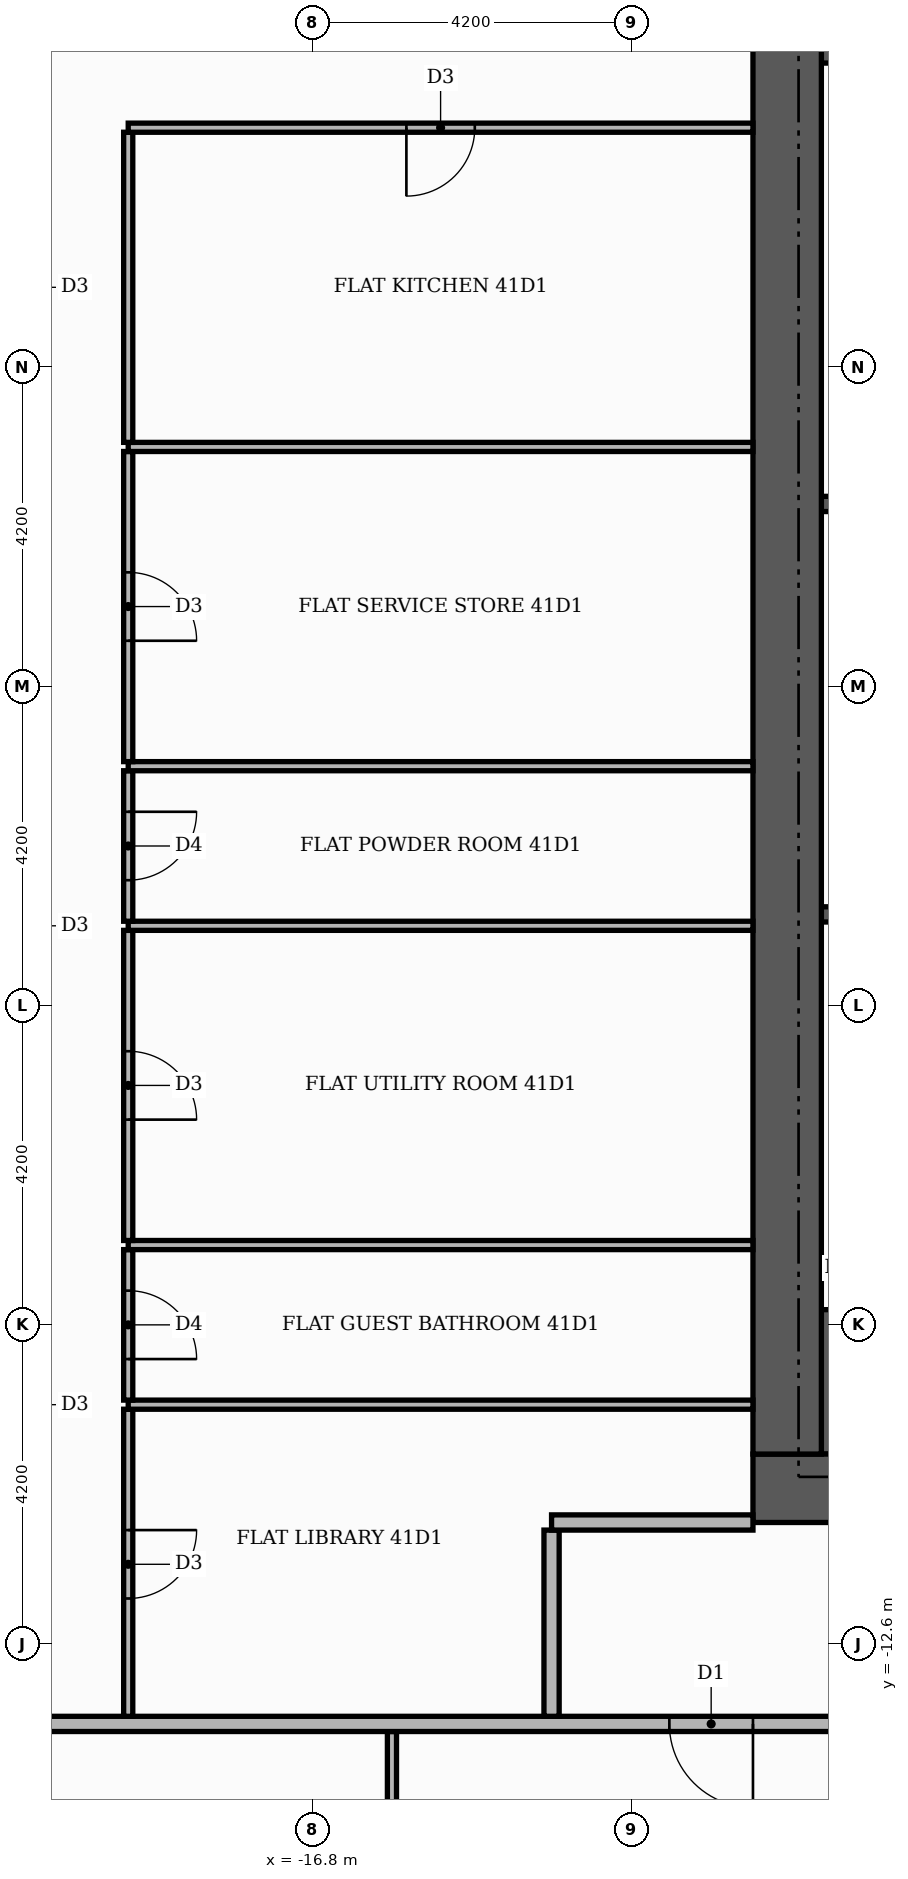
"""IFC4 building model, lengths in metres.
Left out: names, types, materials, properties, quantities, classifications, styles, units other than length and angle.
Written with IfcOpenShell. Run it as: python <this file> out.ifc"""

import sys

from ifc_helpers import new_model, si_unit, direction, frame, frame_2d, origin, place, context, subcontext, project, spatial, rectangle, extrude, element, fill, save


model = new_model("IFC4")
c1 = context("Model", 3, precision=1e-05, world=origin(), true_north=direction((0.0, 1.0)))
c2 = subcontext(c1, "Body", "Model", "MODEL_VIEW")
j1 = project(units=[si_unit("LENGTHUNIT", "METRE"), si_unit("PLANEANGLEUNIT", "RADIAN")], contexts=[c1])
p1 = place(None, origin())
s1 = spatial("IfcSite", under=j1, at=p1, CompositionType="ELEMENT")
p2 = place(p1, origin())
s2 = spatial("IfcBuilding", under=s1, at=p2, CompositionType="ELEMENT")
p3 = place(p2, frame((0.0, 0.0, 172.8)))
s3 = spatial("IfcBuildingStorey", under=s2, at=p3, CompositionType="ELEMENT", Elevation=172.8)
for number, where, z_axis, x_axis in (
    (1, (-10.1, -9.15, 0.0), (0.0, 0.0, 1.0), (1.0, 0.0, 0.0)),
    (2, (-10.1, 9.15, 0.0), (0.0, 0.0, 1.0), (1.0, 0.0, 0.0)),
):
    element("IfcWall", number, at=place(p3, frame(where, z_axis=z_axis, x_axis=x_axis)), inside=s3, PredefinedType="SHEAR", context=c2, shape_type="SweptSolid", body=[
        extrude(rectangle(XDim=4.6, YDim=1.9, at=frame_2d((2.3, 0.0))), origin(), (0.0, 0.0, 1.0), 3.48),
    ])
for number, where, z_axis, x_axis in (
    (3, (-10.1, -3.0, 0.0), (0.0, 0.0, 1.0), (1.0, 0.0, 0.0)),
    (4, (-10.1, 2.4, 0.0), (0.0, 0.0, 1.0), (1.0, 0.0, 0.0)),
):
    element("IfcWall", number, at=place(p3, frame(where, z_axis=z_axis, x_axis=x_axis)), inside=s3, PredefinedType="SHEAR", context=c2, shape_type="SweptSolid", body=[
        extrude(rectangle(XDim=0.9, YDim=0.2, at=frame_2d((0.45, 0.0))), origin(), (0.0, 0.0, 1.0), 3.48),
    ])
p4 = place(p3, frame((-11.0, -10.55, 0.0), z_axis=(0.0, 0.0, 1.0), x_axis=(1.0, 0.0, 0.0)))
e5 = element("IfcWall", 5, at=p4, inside=s3, PredefinedType="SHEAR", context=c2, shape_type="SweptSolid", body=[
    extrude(rectangle(XDim=22.0, YDim=0.9, at=frame_2d((11.0, 0.0))), origin(), (0.0, 0.0, 1.0), 3.48),
])
p5 = place(p4, frame((7.4, 0.0, 0.0)))
e6 = element("IfcOpeningElement", 6, at=p5, cuts=e5, PredefinedType="OPENING", context=c2, shape_type="SweptSolid", body=[
    extrude(rectangle(XDim=1.8, YDim=2.2, at=frame_2d((0.9, 1.1))), frame((0.0, 0.46, 0.0), z_axis=(0.0, -1.0, 0.0), x_axis=(1.0, 0.0, 0.0)), (0.0, 0.0, 1.0), 0.92),
])
p6 = place(p3, frame((-10.55, -10.1, 0.0), z_axis=(0.0, 0.0, 1.0), x_axis=(0.0, 1.0, 0.0)))
e7 = element("IfcWall", 7, at=p6, inside=s3, PredefinedType="SHEAR", context=c2, shape_type="SweptSolid", body=[
    extrude(rectangle(XDim=20.2, YDim=0.9, at=frame_2d((10.1, 0.0))), origin(), (0.0, 0.0, 1.0), 3.48),
])
p7 = place(p3, frame((-15.75, -20.06, 0.0), z_axis=(0.0, 0.0, 1.0), x_axis=(0.0, 1.0, 0.0)))
e8 = element("IfcWall", 8, at=p7, inside=s3, PredefinedType="PARTITIONING", context=c2, shape_type="SweptSolid", body=[
    extrude(rectangle(XDim=6.31, YDim=0.12, at=frame_2d((3.155, 0.0))), origin(), (0.0, 0.0, 1.0), 3.48),
])
p8 = place(p7, frame((2.675, 0.0, 0.0)))
e9 = element("IfcOpeningElement", 9, at=p8, cuts=e8, PredefinedType="OPENING", context=c2, shape_type="SweptSolid", body=[
    extrude(rectangle(XDim=1.0, YDim=2.1, at=frame_2d((0.5, 1.05))), frame((0.0, 0.07, 0.0), z_axis=(0.0, -1.0, 0.0), x_axis=(1.0, 0.0, 0.0)), (0.0, 0.0, 1.0), 0.14),
])
p9 = place(p3, frame((-25.42, -13.65, 0.0), z_axis=(0.0, 0.0, 1.0), x_axis=(1.0, 0.0, 0.0)))
e10 = element("IfcWall", 10, at=p9, inside=s3, PredefinedType="PARTITIONING", context=c2, shape_type="SweptSolid", body=[
    extrude(rectangle(XDim=39.07, YDim=0.2, at=frame_2d((19.535, 0.0))), origin(), (0.0, 0.0, 1.0), 3.48),
])
p10 = place(p9, frame((13.32, 0.0, 0.0)))
e11 = element("IfcOpeningElement", 11, at=p10, cuts=e10, PredefinedType="OPENING", context=c2, shape_type="SweptSolid", body=[
    extrude(rectangle(XDim=1.1, YDim=2.4, at=frame_2d((0.55, 1.2))), frame((0.0, 0.11, 0.0), z_axis=(0.0, -1.0, 0.0), x_axis=(1.0, 0.0, 0.0)), (0.0, 0.0, 1.0), 0.22),
])
p11 = place(p9, frame((21.72, 0.0, 0.0)))
e12 = element("IfcOpeningElement", 12, at=p11, cuts=e10, PredefinedType="OPENING", context=c2, shape_type="SweptSolid", body=[
    extrude(rectangle(XDim=1.1, YDim=2.4, at=frame_2d((0.55, 1.2))), frame((0.0, 0.11, 0.0), z_axis=(0.0, -1.0, 0.0), x_axis=(1.0, 0.0, 0.0)), (0.0, 0.0, 1.0), 0.22),
])
p12 = place(p3, frame((-19.22, -13.55, 0.0), z_axis=(0.0, 0.0, 1.0), x_axis=(0.0, 1.0, 0.0)))
e13 = element("IfcWall", 13, at=p12, inside=s3, PredefinedType="PARTITIONING", context=c2, shape_type="SweptSolid", body=[
    extrude(rectangle(XDim=4.04, YDim=0.12, at=frame_2d((2.02, 0.0))), origin(), (0.0, 0.0, 1.0), 3.48),
])
p13 = place(p12, frame((1.55, 0.0, 0.0)))
e14 = element("IfcOpeningElement", 14, at=p13, cuts=e13, PredefinedType="OPENING", context=c2, shape_type="SweptSolid", body=[
    extrude(rectangle(XDim=0.9, YDim=2.1, at=frame_2d((0.45, 1.05))), frame((0.0, 0.07, 0.0), z_axis=(0.0, -1.0, 0.0), x_axis=(1.0, 0.0, 0.0)), (0.0, 0.0, 1.0), 0.14),
])
p14 = place(p3, frame((-13.65, -13.55, 0.0), z_axis=(0.0, 0.0, 1.0), x_axis=(0.0, 1.0, 0.0)))
e15 = element("IfcWall", 15, at=p14, inside=s3, PredefinedType="PARTITIONING", context=c2, shape_type="SweptSolid", body=[
    extrude(rectangle(XDim=2.45, YDim=0.2, at=frame_2d((1.225, 0.0))), origin(), (0.0, 0.0, 1.0), 3.48),
])
p15 = place(p3, frame((-13.65, -11.0, 0.0), z_axis=(0.0, 0.0, 1.0), x_axis=(1.0, 0.0, 0.0)))
e16 = element("IfcWall", 16, at=p15, inside=s3, PredefinedType="PARTITIONING", context=c2, shape_type="SweptSolid", body=[
    extrude(rectangle(XDim=2.65, YDim=0.2, at=frame_2d((1.325, 0.0))), origin(), (0.0, 0.0, 1.0), 3.48),
])
p16 = place(p3, frame((-19.22, -9.45, 0.0), z_axis=(0.0, 0.0, 1.0), x_axis=(1.0, 0.0, 0.0)))
e17 = element("IfcWall", 17, at=p16, inside=s3, PredefinedType="PARTITIONING", context=c2, shape_type="SweptSolid", body=[
    extrude(rectangle(XDim=8.22, YDim=0.12, at=frame_2d((4.11, 0.0))), origin(), (0.0, 0.0, 1.0), 3.48),
])
p17 = place(p3, frame((-19.22, -9.39, 0.0), z_axis=(0.0, 0.0, 1.0), x_axis=(0.0, 1.0, 0.0)))
e18 = element("IfcWall", 18, at=p17, inside=s3, PredefinedType="PARTITIONING", context=c2, shape_type="SweptSolid", body=[
    extrude(rectangle(XDim=1.98, YDim=0.12, at=frame_2d((0.99, 0.0))), origin(), (0.0, 0.0, 1.0), 3.48),
])
p18 = place(p17, frame((0.54, 0.0, 0.0)))
e19 = element("IfcOpeningElement", 19, at=p18, cuts=e18, PredefinedType="OPENING", context=c2, shape_type="SweptSolid", body=[
    extrude(rectangle(XDim=0.9, YDim=2.1, at=frame_2d((0.45, 1.05))), frame((0.0, 0.07, 0.0), z_axis=(0.0, -1.0, 0.0), x_axis=(1.0, 0.0, 0.0)), (0.0, 0.0, 1.0), 0.14),
])
p19 = place(p3, frame((-19.22, -7.35, 0.0), z_axis=(0.0, 0.0, 1.0), x_axis=(1.0, 0.0, 0.0)))
e20 = element("IfcWall", 20, at=p19, inside=s3, PredefinedType="PARTITIONING", context=c2, shape_type="SweptSolid", body=[
    extrude(rectangle(XDim=8.22, YDim=0.12, at=frame_2d((4.11, 0.0))), origin(), (0.0, 0.0, 1.0), 3.48),
])
p20 = place(p3, frame((-19.22, -7.29, 0.0), z_axis=(0.0, 0.0, 1.0), x_axis=(0.0, 1.0, 0.0)))
e21 = element("IfcWall", 21, at=p20, inside=s3, PredefinedType="PARTITIONING", context=c2, shape_type="SweptSolid", body=[
    extrude(rectangle(XDim=4.08, YDim=0.12, at=frame_2d((2.04, 0.0))), origin(), (0.0, 0.0, 1.0), 3.48),
])
p21 = place(p20, frame((1.59, 0.0, 0.0)))
e22 = element("IfcOpeningElement", 22, at=p21, cuts=e21, PredefinedType="OPENING", context=c2, shape_type="SweptSolid", body=[
    extrude(rectangle(XDim=0.9, YDim=2.1, at=frame_2d((0.45, 1.05))), frame((0.0, 0.07, 0.0), z_axis=(0.0, -1.0, 0.0), x_axis=(1.0, 0.0, 0.0)), (0.0, 0.0, 1.0), 0.14),
])
p22 = place(p3, frame((-19.22, -3.15, 0.0), z_axis=(0.0, 0.0, 1.0), x_axis=(1.0, 0.0, 0.0)))
e23 = element("IfcWall", 23, at=p22, inside=s3, PredefinedType="PARTITIONING", context=c2, shape_type="SweptSolid", body=[
    extrude(rectangle(XDim=8.22, YDim=0.12, at=frame_2d((4.11, 0.0))), origin(), (0.0, 0.0, 1.0), 3.48),
])
p23 = place(p3, frame((-19.22, -3.09, 0.0), z_axis=(0.0, 0.0, 1.0), x_axis=(0.0, 1.0, 0.0)))
e24 = element("IfcWall", 24, at=p23, inside=s3, PredefinedType="PARTITIONING", context=c2, shape_type="SweptSolid", body=[
    extrude(rectangle(XDim=1.98, YDim=0.12, at=frame_2d((0.99, 0.0))), origin(), (0.0, 0.0, 1.0), 3.48),
])
p24 = place(p23, frame((0.54, 0.0, 0.0)))
e25 = element("IfcOpeningElement", 25, at=p24, cuts=e24, PredefinedType="OPENING", context=c2, shape_type="SweptSolid", body=[
    extrude(rectangle(XDim=0.9, YDim=2.1, at=frame_2d((0.45, 1.05))), frame((0.0, 0.07, 0.0), z_axis=(0.0, -1.0, 0.0), x_axis=(1.0, 0.0, 0.0)), (0.0, 0.0, 1.0), 0.14),
])
p25 = place(p3, frame((-19.22, -1.05, 0.0), z_axis=(0.0, 0.0, 1.0), x_axis=(1.0, 0.0, 0.0)))
e26 = element("IfcWall", 26, at=p25, inside=s3, PredefinedType="PARTITIONING", context=c2, shape_type="SweptSolid", body=[
    extrude(rectangle(XDim=8.22, YDim=0.12, at=frame_2d((4.11, 0.0))), origin(), (0.0, 0.0, 1.0), 3.48),
])
p26 = place(p3, frame((-19.22, -0.99, 0.0), z_axis=(0.0, 0.0, 1.0), x_axis=(0.0, 1.0, 0.0)))
e27 = element("IfcWall", 27, at=p26, inside=s3, PredefinedType="PARTITIONING", context=c2, shape_type="SweptSolid", body=[
    extrude(rectangle(XDim=4.08, YDim=0.12, at=frame_2d((2.04, 0.0))), origin(), (0.0, 0.0, 1.0), 3.48),
])
p27 = place(p26, frame((1.59, 0.0, 0.0)))
e28 = element("IfcOpeningElement", 28, at=p27, cuts=e27, PredefinedType="OPENING", context=c2, shape_type="SweptSolid", body=[
    extrude(rectangle(XDim=0.9, YDim=2.1, at=frame_2d((0.45, 1.05))), frame((0.0, 0.07, 0.0), z_axis=(0.0, -1.0, 0.0), x_axis=(1.0, 0.0, 0.0)), (0.0, 0.0, 1.0), 0.14),
])
p28 = place(p3, frame((-19.22, 3.15, 0.0), z_axis=(0.0, 0.0, 1.0), x_axis=(1.0, 0.0, 0.0)))
e29 = element("IfcWall", 29, at=p28, inside=s3, PredefinedType="PARTITIONING", context=c2, shape_type="SweptSolid", body=[
    extrude(rectangle(XDim=8.22, YDim=0.12, at=frame_2d((4.11, 0.0))), origin(), (0.0, 0.0, 1.0), 3.48),
])
p29 = place(p3, frame((-19.22, 3.21, 0.0), z_axis=(0.0, 0.0, 1.0), x_axis=(0.0, 1.0, 0.0)))
e30 = element("IfcWall", 30, at=p29, inside=s3, PredefinedType="PARTITIONING", context=c2, shape_type="SweptSolid", body=[
    extrude(rectangle(XDim=4.08, YDim=0.12, at=frame_2d((2.04, 0.0))), origin(), (0.0, 0.0, 1.0), 3.48),
])
p30 = place(p3, frame((-19.22, 7.35, 0.0), z_axis=(0.0, 0.0, 1.0), x_axis=(1.0, 0.0, 0.0)))
e31 = element("IfcWall", 31, at=p30, inside=s3, PredefinedType="PARTITIONING", context=c2, shape_type="SweptSolid", body=[
    extrude(rectangle(XDim=8.22, YDim=0.12, at=frame_2d((4.11, 0.0))), origin(), (0.0, 0.0, 1.0), 3.48),
])
p31 = place(p30, frame((3.66, 0.0, 0.0)))
e32 = element("IfcOpeningElement", 32, at=p31, cuts=e31, PredefinedType="OPENING", context=c2, shape_type="SweptSolid", body=[
    extrude(rectangle(XDim=0.9, YDim=2.1, at=frame_2d((0.45, 1.05))), frame((0.0, 0.07, 0.0), z_axis=(0.0, -1.0, 0.0), x_axis=(1.0, 0.0, 0.0)), (0.0, 0.0, 1.0), 0.14),
])
p32 = place(p10, frame((1.1, 0.0, 0.0), z_axis=(0.0, 0.0, 1.0), x_axis=(-1.0, 0.0, 0.0)))
e33 = element("IfcDoor", 33, at=p32, inside=s3, OperationType="SINGLE_SWING_RIGHT", PredefinedType="DOOR", context=c2, shape_type="SweptSolid", body=[
    extrude(rectangle(XDim=1.1, YDim=2.4, at=frame_2d((0.55, 1.2))), frame((0.0, 0.025, 0.0), z_axis=(0.0, -1.0, 0.0), x_axis=(1.0, 0.0, 0.0)), (0.0, 0.0, 1.0), 0.05),
])
fill(e11, e33)
p33 = place(p31, frame((0.9, 0.0, 0.0), z_axis=(0.0, 0.0, 1.0), x_axis=(-1.0, 0.0, 0.0)))
e34 = element("IfcDoor", 34, at=p33, inside=s3, OperationType="SINGLE_SWING_LEFT", PredefinedType="DOOR", context=c2, shape_type="SweptSolid", body=[
    extrude(rectangle(XDim=0.9, YDim=2.1, at=frame_2d((0.45, 1.05))), frame((0.0, 0.025, 0.0), z_axis=(0.0, -1.0, 0.0), x_axis=(1.0, 0.0, 0.0)), (0.0, 0.0, 1.0), 0.05),
])
fill(e32, e34)
p34 = place(p27, frame((0.9, 0.0, 0.0), z_axis=(0.0, 0.0, 1.0), x_axis=(-1.0, 0.0, 0.0)))
e35 = element("IfcDoor", 35, at=p34, inside=s3, OperationType="SINGLE_SWING_LEFT", PredefinedType="DOOR", context=c2, shape_type="SweptSolid", body=[
    extrude(rectangle(XDim=0.9, YDim=2.1, at=frame_2d((0.45, 1.05))), frame((0.0, 0.025, 0.0), z_axis=(0.0, -1.0, 0.0), x_axis=(1.0, 0.0, 0.0)), (0.0, 0.0, 1.0), 0.05),
])
fill(e28, e35)
p35 = place(p24, frame((0.9, 0.0, 0.0), z_axis=(0.0, 0.0, 1.0), x_axis=(-1.0, 0.0, 0.0)))
e36 = element("IfcDoor", 36, at=p35, inside=s3, OperationType="SINGLE_SWING_RIGHT", PredefinedType="DOOR", context=c2, shape_type="SweptSolid", body=[
    extrude(rectangle(XDim=0.9, YDim=2.1, at=frame_2d((0.45, 1.05))), frame((0.0, 0.025, 0.0), z_axis=(0.0, -1.0, 0.0), x_axis=(1.0, 0.0, 0.0)), (0.0, 0.0, 1.0), 0.05),
])
fill(e25, e36)
p36 = place(p21, frame((0.9, 0.0, 0.0), z_axis=(0.0, 0.0, 1.0), x_axis=(-1.0, 0.0, 0.0)))
e37 = element("IfcDoor", 37, at=p36, inside=s3, OperationType="SINGLE_SWING_LEFT", PredefinedType="DOOR", context=c2, shape_type="SweptSolid", body=[
    extrude(rectangle(XDim=0.9, YDim=2.1, at=frame_2d((0.45, 1.05))), frame((0.0, 0.025, 0.0), z_axis=(0.0, -1.0, 0.0), x_axis=(1.0, 0.0, 0.0)), (0.0, 0.0, 1.0), 0.05),
])
fill(e22, e37)
p37 = place(p18, frame((0.9, 0.0, 0.0), z_axis=(0.0, 0.0, 1.0), x_axis=(-1.0, 0.0, 0.0)))
e38 = element("IfcDoor", 38, at=p37, inside=s3, OperationType="SINGLE_SWING_LEFT", PredefinedType="DOOR", context=c2, shape_type="SweptSolid", body=[
    extrude(rectangle(XDim=0.9, YDim=2.1, at=frame_2d((0.45, 1.05))), frame((0.0, 0.025, 0.0), z_axis=(0.0, -1.0, 0.0), x_axis=(1.0, 0.0, 0.0)), (0.0, 0.0, 1.0), 0.05),
])
fill(e19, e38)
p38 = place(p13, frame((0.9, 0.0, 0.0), z_axis=(0.0, 0.0, 1.0), x_axis=(-1.0, 0.0, 0.0)))
e39 = element("IfcDoor", 39, at=p38, inside=s3, OperationType="SINGLE_SWING_RIGHT", PredefinedType="DOOR", context=c2, shape_type="SweptSolid", body=[
    extrude(rectangle(XDim=0.9, YDim=2.1, at=frame_2d((0.45, 1.05))), frame((0.0, 0.025, 0.0), z_axis=(0.0, -1.0, 0.0), x_axis=(1.0, 0.0, 0.0)), (0.0, 0.0, 1.0), 0.05),
])
fill(e14, e39)
save(model, sys.argv[1])
